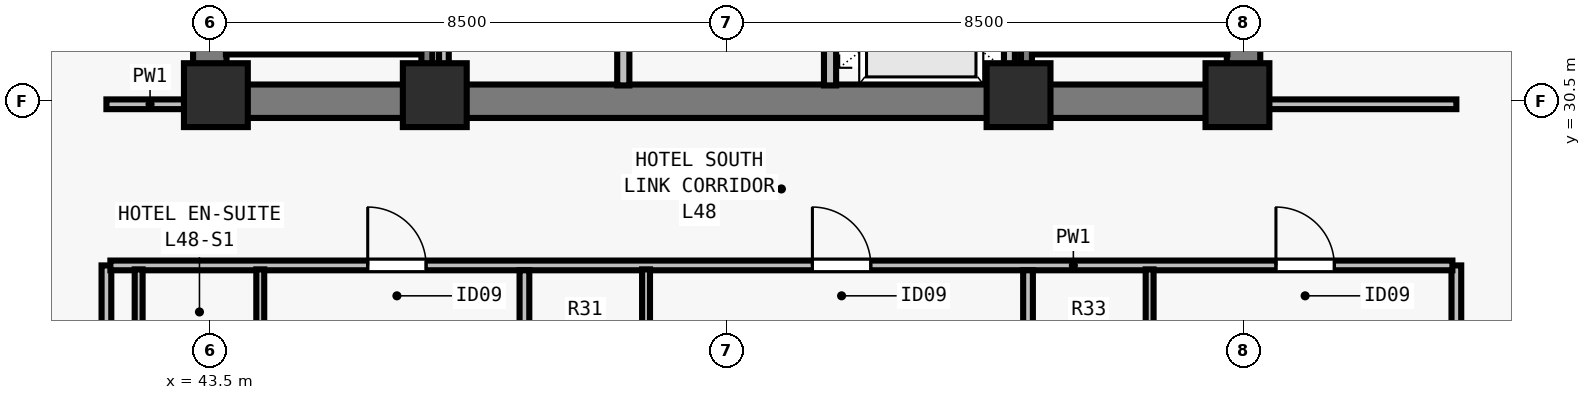
"""IFC4 building model, lengths in metres.
Left out: names, types, materials, properties, quantities, classifications, styles, units other than length and angle.
Written with IfcOpenShell. Run it as: python <this file> out.ifc"""

import sys

from ifc_helpers import new_model, si_unit, direction, frame, frame_2d, origin, origin_2d, place, context, subcontext, project, spatial, rectangle, extrude, element, fill, save


model = new_model("IFC4")
c1 = context("Model", 3, precision=1e-05, world=origin(), true_north=direction((0.0, 1.0)))
c2 = subcontext(c1, "Body", "Model", "MODEL_VIEW")
j1 = project(units=[si_unit("LENGTHUNIT", "METRE"), si_unit("PLANEANGLEUNIT", "RADIAN")], contexts=[c1])
p1 = place(None, origin())
s1 = spatial("IfcSite", under=j1, at=p1, CompositionType="ELEMENT")
p2 = place(p1, origin())
s2 = spatial("IfcBuilding", under=s1, at=p2, CompositionType="ELEMENT")
p3 = place(p2, frame((0.0, 0.0, 176.0)))
s3 = spatial("IfcBuildingStorey", under=s2, at=p3, CompositionType="ELEMENT", Elevation=176.0)
for number, where, z_axis, x_axis in (
    (1, (43.6, 30.6, 0.0), (0.0, 0.0, 1.0), (1.0, 0.0, 0.0)),
    (2, (47.2, 30.6, 0.0), (0.0, 0.0, 1.0), (1.0, 0.0, 0.0)),
    (3, (56.8, 30.6, 0.0), (0.0, 0.0, 1.0), (1.0, 0.0, 0.0)),
    (4, (60.4, 30.6, 0.0), (0.0, 0.0, 1.0), (1.0, 0.0, 0.0)),
):
    element("IfcColumn", number, at=place(p3, frame(where, z_axis=z_axis, x_axis=x_axis)), inside=s3, PredefinedType="COLUMN", context=c2, shape_type="SweptSolid", body=[
        extrude(rectangle(XDim=1.05, YDim=1.05, at=origin_2d()), origin(), (0.0, 0.0, 1.0), 3.5),
    ])
p4 = place(p3, frame((43.225, 30.5, 0.0), z_axis=(0.0, 0.0, 1.0), x_axis=(1.0, 0.0, 0.0)))
e5 = element("IfcWall", 5, at=p4, inside=s3, PredefinedType="SHEAR", context=c2, shape_type="SweptSolid", body=[
    extrude(rectangle(XDim=17.55, YDim=0.55, at=frame_2d((8.775, 0.0))), origin(), (0.0, 0.0, 1.0), 3.28),
])
for number, where, z_axis, x_axis in (
    (6, (43.5, 30.765, 0.0), (0.0, 0.0, 1.0), (0.0, 1.0, 0.0)),
    (7, (60.5, 30.765, 0.0), (0.0, 0.0, 1.0), (0.0, 1.0, 0.0)),
):
    element("IfcWall", number, at=place(p3, frame(where, z_axis=z_axis, x_axis=x_axis)), inside=s3, PredefinedType="SHEAR", context=c2, shape_type="SweptSolid", body=[
        extrude(rectangle(XDim=7.985, YDim=0.55, at=frame_2d((3.993, 0.0))), origin(), (0.0, 0.0, 1.0), 3.28),
    ])
p5 = place(p3, frame((50.3, 30.76, 0.0), z_axis=(0.0, 0.0, 1.0), x_axis=(0.0, 1.0, 0.0)))
e8 = element("IfcWall", 8, at=p5, inside=s3, PredefinedType="SOLIDWALL", context=c2, shape_type="SweptSolid", body=[
    extrude(rectangle(XDim=7.855, YDim=0.2, at=frame_2d((3.927, 0.0))), origin(), (0.0, 0.0, 1.0), 3.28),
])
p6 = place(p5, frame((3.29, 0.0, 0.0)))
e9 = element("IfcOpeningElement", 9, at=p6, cuts=e8, PredefinedType="OPENING", context=c2, shape_type="SweptSolid", body=[
    extrude(rectangle(XDim=0.9, YDim=2.12, at=frame_2d((0.45, 1.06))), frame((0.0, 0.11, 0.0), z_axis=(0.0, -1.0, 0.0), x_axis=(1.0, 0.0, 0.0)), (0.0, 0.0, 1.0), 0.22),
])
p7 = place(p3, frame((53.7, 30.76, 0.0), z_axis=(0.0, 0.0, 1.0), x_axis=(0.0, 1.0, 0.0)))
e10 = element("IfcWall", 10, at=p7, inside=s3, PredefinedType="SOLIDWALL", context=c2, shape_type="SweptSolid", body=[
    extrude(rectangle(XDim=7.855, YDim=0.2, at=frame_2d((3.927, 0.0))), origin(), (0.0, 0.0, 1.0), 3.28),
])
p8 = place(p7, frame((0.79, 0.0, 0.0)))
e11 = element("IfcOpeningElement", 11, at=p8, cuts=e10, PredefinedType="OPENING", context=c2, shape_type="SweptSolid", body=[
    extrude(rectangle(XDim=1.1, YDim=2.2, at=frame_2d((0.55, 1.1))), frame((0.0, 0.11, 0.0), z_axis=(0.0, -1.0, 0.0), x_axis=(1.0, 0.0, 0.0)), (0.0, 0.0, 1.0), 0.22),
])
p9 = place(p7, frame((3.49, 0.0, 0.0)))
e12 = element("IfcOpeningElement", 12, at=p9, cuts=e10, PredefinedType="OPENING", context=c2, shape_type="SweptSolid", body=[
    extrude(rectangle(XDim=1.1, YDim=2.2, at=frame_2d((0.55, 1.1))), frame((0.0, 0.11, 0.0), z_axis=(0.0, -1.0, 0.0), x_axis=(1.0, 0.0, 0.0)), (0.0, 0.0, 1.0), 0.22),
])
p10 = place(p7, frame((6.19, 0.0, 0.0)))
e13 = element("IfcOpeningElement", 13, at=p10, cuts=e10, PredefinedType="OPENING", context=c2, shape_type="SweptSolid", body=[
    extrude(rectangle(XDim=1.1, YDim=2.2, at=frame_2d((0.55, 1.1))), frame((0.0, 0.11, 0.0), z_axis=(0.0, -1.0, 0.0), x_axis=(1.0, 0.0, 0.0)), (0.0, 0.0, 1.0), 0.22),
])
p11 = place(p3, frame((47.35, 30.76, 0.0), z_axis=(0.0, 0.0, 1.0), x_axis=(0.0, 1.0, 0.0)))
e14 = element("IfcWall", 14, at=p11, inside=s3, PredefinedType="PARTITIONING", context=c2, shape_type="SweptSolid", body=[
    extrude(rectangle(XDim=7.855, YDim=0.16, at=frame_2d((3.927, 0.0))), origin(), (0.0, 0.0, 1.0), 3.28),
])
p12 = place(p3, frame((56.65, 30.76, 0.0), z_axis=(0.0, 0.0, 1.0), x_axis=(0.0, 1.0, 0.0)))
e15 = element("IfcWall", 15, at=p12, inside=s3, PredefinedType="SOLIDWALL", context=c2, shape_type="SweptSolid", body=[
    extrude(rectangle(XDim=7.855, YDim=0.18, at=frame_2d((3.927, 0.0))), origin(), (0.0, 0.0, 1.0), 3.28),
])
p13 = place(p3, frame((41.8, 15.325, 0.0), z_axis=(0.0, 0.0, 1.0), x_axis=(0.0, 1.0, 0.0)))
e16 = element("IfcWall", 16, at=p13, inside=s3, PredefinedType="PARTITIONING", context=c2, shape_type="SweptSolid", body=[
    extrude(rectangle(XDim=12.475, YDim=0.16, at=frame_2d((6.238, 0.0))), origin(), (0.0, 0.0, 1.0), 3.28),
])
p14 = place(p3, frame((41.8, 30.45, 0.0), z_axis=(0.0, 0.0, 1.0), x_axis=(1.0, 0.0, 0.0)))
e17 = element("IfcWall", 17, at=p14, inside=s3, PredefinedType="PARTITIONING", context=c2, shape_type="SweptSolid", body=[
    extrude(rectangle(XDim=1.435, YDim=0.16, at=frame_2d((0.718, 0.0))), origin(), (0.0, 0.0, 1.0), 3.28),
])
p15 = place(p3, frame((64.0, 15.325, 0.0), z_axis=(0.0, 0.0, 1.0), x_axis=(0.0, 1.0, 0.0)))
e18 = element("IfcWall", 18, at=p15, inside=s3, PredefinedType="PARTITIONING", context=c2, shape_type="SweptSolid", body=[
    extrude(rectangle(XDim=12.475, YDim=0.16, at=frame_2d((6.238, 0.0))), origin(), (0.0, 0.0, 1.0), 2.555),
])
p16 = place(p3, frame((60.765, 30.45, 0.0), z_axis=(0.0, 0.0, 1.0), x_axis=(1.0, 0.0, 0.0)))
e19 = element("IfcWall", 19, at=p16, inside=s3, PredefinedType="PARTITIONING", context=c2, shape_type="SweptSolid", body=[
    extrude(rectangle(XDim=3.235, YDim=0.16, at=frame_2d((1.618, 0.0))), origin(), (0.0, 0.0, 1.0), 3.28),
])
p17 = place(p3, frame((41.865, 27.8, 0.0), z_axis=(0.0, 0.0, 1.0), x_axis=(1.0, 0.0, 0.0)))
e20 = element("IfcWall", 20, at=p17, inside=s3, PredefinedType="PARTITIONING", context=c2, shape_type="SweptSolid", body=[
    extrude(rectangle(XDim=22.07, YDim=0.16, at=frame_2d((11.035, 0.0))), origin(), (0.0, 0.0, 1.0), 3.28),
])
p18 = place(p17, frame((4.232, 0.0, 0.0)))
e21 = element("IfcOpeningElement", 21, at=p18, cuts=e20, PredefinedType="OPENING", context=c2, shape_type="SweptSolid", body=[
    extrude(rectangle(XDim=0.96, YDim=2.15, at=frame_2d((0.48, 1.075))), frame((0.0, 0.09, 0.0), z_axis=(0.0, -1.0, 0.0), x_axis=(1.0, 0.0, 0.0)), (0.0, 0.0, 1.0), 0.18),
])
p19 = place(p17, frame((11.545, 0.0, 0.0)))
e22 = element("IfcOpeningElement", 22, at=p19, cuts=e20, PredefinedType="OPENING", context=c2, shape_type="SweptSolid", body=[
    extrude(rectangle(XDim=0.96, YDim=2.15, at=frame_2d((0.48, 1.075))), frame((0.0, 0.09, 0.0), z_axis=(0.0, -1.0, 0.0), x_axis=(1.0, 0.0, 0.0)), (0.0, 0.0, 1.0), 0.18),
])
p20 = place(p17, frame((19.168, 0.0, 0.0)))
e23 = element("IfcOpeningElement", 23, at=p20, cuts=e20, PredefinedType="OPENING", context=c2, shape_type="SweptSolid", body=[
    extrude(rectangle(XDim=0.96, YDim=2.15, at=frame_2d((0.48, 1.075))), frame((0.0, 0.09, 0.0), z_axis=(0.0, -1.0, 0.0), x_axis=(1.0, 0.0, 0.0)), (0.0, 0.0, 1.0), 0.18),
])
for number, where, z_axis, x_axis in (
    (24, (42.33, 25.42, 0.0), (0.0, 0.0, 1.0), (0.0, 1.0, 0.0)),
    (25, (44.33, 25.42, 0.0), (0.0, 0.0, 1.0), (0.0, 1.0, 0.0)),
):
    element("IfcWall", number, at=place(p3, frame(where, z_axis=z_axis, x_axis=x_axis)), inside=s3, PredefinedType="PLUMBINGWALL", context=c2, shape_type="SweptSolid", body=[
        extrude(rectangle(XDim=2.315, YDim=0.13, at=frame_2d((1.158, 0.0))), origin(), (0.0, 0.0, 1.0), 3.28),
    ])
p21 = place(p3, frame((48.674, 15.325, 0.0), z_axis=(0.0, 0.0, 1.0), x_axis=(0.0, 1.0, 0.0)))
e26 = element("IfcWall", 26, at=p21, inside=s3, PredefinedType="PARTITIONING", context=c2, shape_type="SweptSolid", body=[
    extrude(rectangle(XDim=12.395, YDim=0.16, at=frame_2d((6.198, 0.0))), origin(), (0.0, 0.0, 1.0), 2.896),
])
p22 = place(p3, frame((50.674, 25.42, 0.0), z_axis=(0.0, 0.0, 1.0), x_axis=(0.0, 1.0, 0.0)))
e27 = element("IfcWall", 27, at=p22, inside=s3, PredefinedType="PLUMBINGWALL", context=c2, shape_type="SweptSolid", body=[
    extrude(rectangle(XDim=2.315, YDim=0.13, at=frame_2d((1.158, 0.0))), origin(), (0.0, 0.0, 1.0), 3.28),
])
p23 = place(p3, frame((56.956, 15.325, 0.0), z_axis=(0.0, 0.0, 1.0), x_axis=(0.0, 1.0, 0.0)))
e28 = element("IfcWall", 28, at=p23, inside=s3, PredefinedType="PARTITIONING", context=c2, shape_type="SweptSolid", body=[
    extrude(rectangle(XDim=12.395, YDim=0.16, at=frame_2d((6.198, 0.0))), origin(), (0.0, 0.0, 1.0), 2.555),
])
p24 = place(p3, frame((58.956, 25.42, 0.0), z_axis=(0.0, 0.0, 1.0), x_axis=(0.0, 1.0, 0.0)))
e29 = element("IfcWall", 29, at=p24, inside=s3, PredefinedType="PLUMBINGWALL", context=c2, shape_type="SweptSolid", body=[
    extrude(rectangle(XDim=2.315, YDim=0.13, at=frame_2d((1.158, 0.0))), origin(), (0.0, 0.0, 1.0), 3.28),
])
p25 = place(p3, frame((43.765, 31.36, 0.0), z_axis=(0.0, 0.0, 1.0), x_axis=(1.0, 0.0, 0.0)))
e30 = element("IfcWall", 30, at=p25, inside=s3, PredefinedType="SOLIDWALL", context=c2, shape_type="SweptSolid", body=[
    extrude(rectangle(XDim=3.23, YDim=0.18, at=frame_2d((1.615, 0.0))), origin(), (0.0, 0.0, 1.0), 3.28),
])
p26 = place(p3, frame((47.07, 38.78, 0.0), z_axis=(0.0, 0.0, 1.0), x_axis=(0.0, -1.0, 0.0)))
e31 = element("IfcWall", 31, at=p26, inside=s3, PredefinedType="SOLIDWALL", context=c2, shape_type="SweptSolid", body=[
    extrude(rectangle(XDim=8.017, YDim=0.18, at=frame_2d((4.009, 0.0))), origin(), (0.0, 0.0, 1.0), 3.28),
])
p27 = place(p3, frame((57.005, 31.36, 0.0), z_axis=(0.0, 0.0, 1.0), x_axis=(1.0, 0.0, 0.0)))
e32 = element("IfcWall", 32, at=p27, inside=s3, PredefinedType="SOLIDWALL", context=c2, shape_type="SweptSolid", body=[
    extrude(rectangle(XDim=3.23, YDim=0.18, at=frame_2d((1.615, 0.0))), origin(), (0.0, 0.0, 1.0), 3.28),
])
p28 = place(p3, frame((56.93, 38.78, 0.0), z_axis=(0.0, 0.0, 1.0), x_axis=(0.0, -1.0, 0.0)))
e33 = element("IfcWall", 33, at=p28, inside=s3, PredefinedType="SOLIDWALL", context=c2, shape_type="SweptSolid", body=[
    extrude(rectangle(XDim=8.017, YDim=0.18, at=frame_2d((4.009, 0.0))), origin(), (0.0, 0.0, 1.0), 3.28),
])
p29 = place(p18, origin())
e34 = element("IfcDoor", 34, at=p29, inside=s3, OperationType="SINGLE_SWING_LEFT", PredefinedType="DOOR", context=c2, shape_type="SweptSolid", body=[
    extrude(rectangle(XDim=0.96, YDim=2.15, at=frame_2d((0.48, 1.075))), frame((0.0, 0.025, 0.0), z_axis=(0.0, -1.0, 0.0), x_axis=(1.0, 0.0, 0.0)), (0.0, 0.0, 1.0), 0.05),
])
fill(e21, e34)
p30 = place(p19, origin())
e35 = element("IfcDoor", 35, at=p30, inside=s3, OperationType="SINGLE_SWING_LEFT", PredefinedType="DOOR", context=c2, shape_type="SweptSolid", body=[
    extrude(rectangle(XDim=0.96, YDim=2.15, at=frame_2d((0.48, 1.075))), frame((0.0, 0.025, 0.0), z_axis=(0.0, -1.0, 0.0), x_axis=(1.0, 0.0, 0.0)), (0.0, 0.0, 1.0), 0.05),
])
fill(e22, e35)
p31 = place(p20, origin())
e36 = element("IfcDoor", 36, at=p31, inside=s3, OperationType="SINGLE_SWING_LEFT", PredefinedType="DOOR", context=c2, shape_type="SweptSolid", body=[
    extrude(rectangle(XDim=0.96, YDim=2.15, at=frame_2d((0.48, 1.075))), frame((0.0, 0.025, 0.0), z_axis=(0.0, -1.0, 0.0), x_axis=(1.0, 0.0, 0.0)), (0.0, 0.0, 1.0), 0.05),
])
fill(e23, e36)
save(model, sys.argv[1])
